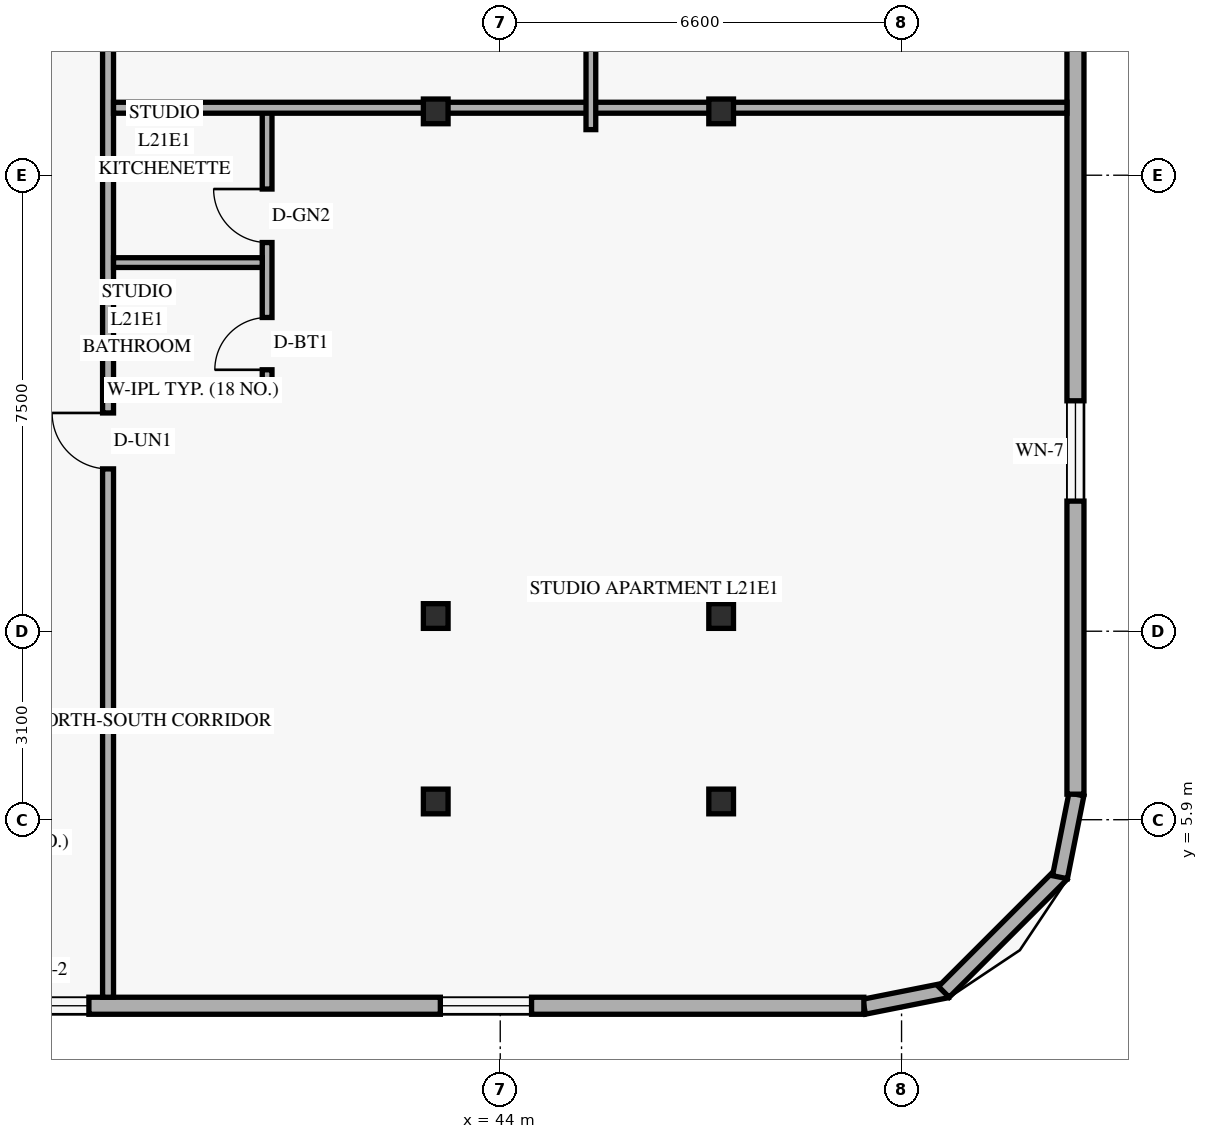
"""IFC4 building model, lengths in metres.
Left out: names, types, materials, properties, quantities, classifications, styles, units other than length and angle.
Written with IfcOpenShell. Run it as: python <this file> out.ifc"""

import sys

from ifc_helpers import new_model, si_unit, direction, frame, frame_2d, origin, origin_2d, place, context, subcontext, project, spatial, rectangle, hollow_rectangle, extrude, element, fill, save


model = new_model("IFC4")
c1 = context("Model", 3, precision=1e-05, world=origin(), true_north=direction((0.0, 1.0)))
c2 = subcontext(c1, "Body", "Model", "MODEL_VIEW")
j1 = project(units=[si_unit("LENGTHUNIT", "METRE"), si_unit("PLANEANGLEUNIT", "RADIAN")], contexts=[c1])
p1 = place(None, origin())
s1 = spatial("IfcSite", under=j1, at=p1, CompositionType="ELEMENT")
p2 = place(p1, origin())
s2 = spatial("IfcBuilding", under=s1, at=p2, CompositionType="ELEMENT")
p3 = place(p2, frame((0.0, 0.0, 84.0)))
s3 = spatial("IfcBuildingStorey", under=s2, at=p3, CompositionType="ELEMENT", Elevation=84.0)
for number, where, z_axis, x_axis in (
    (1, (42.876, 6.2, 0.0), (0.035, 0.0, 0.999), (0.0, 1.0, 0.0)),
    (2, (42.876, 9.25, 0.0), (0.035, 0.0, 0.999), (0.0, 1.0, 0.0)),
    (3, (42.876, 17.55, 0.0), (0.035, 0.0, 0.999), (0.0, 1.0, 0.0)),
):
    element("IfcColumn", number, at=place(p3, frame(where, z_axis=z_axis, x_axis=x_axis)), inside=s3, PredefinedType="COLUMN", context=c2, shape_type="SweptSolid", body=[
        extrude(hollow_rectangle(XDim=0.406, YDim=0.406, WallThickness=0.016, at=origin_2d()), origin(), (0.0, 0.0, 1.0), 3.602),
    ])
for number, where, z_axis, x_axis in (
    (4, (47.529, 6.2, 0.0), (0.058, 0.0, 0.998), (0.0, 1.0, 0.0)),
    (5, (47.529, 9.25, 0.0), (0.058, 0.0, 0.998), (0.0, 1.0, 0.0)),
    (6, (47.529, 17.55, 0.0), (0.058, 0.0, 0.998), (0.0, 1.0, 0.0)),
):
    element("IfcColumn", number, at=place(p3, frame(where, z_axis=z_axis, x_axis=x_axis)), inside=s3, PredefinedType="COLUMN", context=c2, shape_type="SweptSolid", body=[
        extrude(hollow_rectangle(XDim=0.406, YDim=0.406, WallThickness=0.016, at=origin_2d()), origin(), (0.0, 0.0, 1.0), 3.606),
    ])
p4 = place(p3, frame((49.983, 2.824, 0.0), z_axis=(0.0, 0.0, 1.0), x_axis=(0.980809899341, 0.19496651342, 0.0)))
e7 = element("IfcWall", 7, at=p4, inside=s3, PredefinedType="SOLIDWALL", context=c2, shape_type="SweptSolid", body=[
    extrude(rectangle(XDim=1.389, YDim=0.25, at=frame_2d((0.694, 0.0))), origin(), (0.0, 0.0, 1.0), 3.36),
])
p5 = place(p3, frame((51.295, 3.068, 0.0), z_axis=(0.0, 0.0, 1.0), x_axis=(0.707151344399, 0.707062215165, 0.0)))
e8 = element("IfcWall", 8, at=p5, inside=s3, PredefinedType="SOLIDWALL", context=c2, shape_type="SweptSolid", body=[
    extrude(rectangle(XDim=2.739, YDim=0.25, at=frame_2d((1.37, 0.0))), origin(), (0.0, 0.0, 1.0), 3.36),
])
p6 = place(p3, frame((53.205, 4.955, 0.0), z_axis=(0.0, 0.0, 1.0), x_axis=(0.195000137217, 0.980803214965, 0.0)))
e9 = element("IfcWall", 9, at=p6, inside=s3, PredefinedType="SOLIDWALL", context=c2, shape_type="SweptSolid", body=[
    extrude(rectangle(XDim=1.388, YDim=0.25, at=frame_2d((0.694, 0.0))), origin(), (0.0, 0.0, 1.0), 3.36),
])
p7 = place(p3, frame((34.4, 2.84, 0.0), z_axis=(0.0, 0.0, 1.0), x_axis=(1.0, 0.0, 0.0)))
e10 = element("IfcWall", 10, at=p7, inside=s3, PredefinedType="SOLIDWALL", context=c2, shape_type="SweptSolid", body=[
    extrude(rectangle(XDim=15.58, YDim=0.28, at=frame_2d((7.79, 0.0))), origin(), (0.0, 0.0, 1.0), 3.36),
])
p8 = place(p7, frame((1.335, 0.0, 0.85)))
e11 = element("IfcOpeningElement", 11, at=p8, cuts=e10, PredefinedType="OPENING", context=c2, shape_type="SweptSolid", body=[
    extrude(rectangle(XDim=1.5, YDim=1.55, at=frame_2d((0.75, 0.775))), frame((0.0, 0.15, 0.0), z_axis=(0.0, -1.0, 0.0), x_axis=(1.0, 0.0, 0.0)), (0.0, 0.0, 1.0), 0.3),
])
p9 = place(p7, frame((8.615, 0.0, 0.85)))
e12 = element("IfcOpeningElement", 12, at=p9, cuts=e10, PredefinedType="OPENING", context=c2, shape_type="SweptSolid", body=[
    extrude(rectangle(XDim=1.5, YDim=1.55, at=frame_2d((0.75, 0.775))), frame((0.0, 0.15, 0.0), z_axis=(0.0, -1.0, 0.0), x_axis=(1.0, 0.0, 0.0)), (0.0, 0.0, 1.0), 0.3),
])
p10 = place(p3, frame((53.46, 6.32, 0.0), z_axis=(0.0, 0.0, 1.0), x_axis=(0.0, 1.0, 0.0)))
e13 = element("IfcWall", 13, at=p10, inside=s3, PredefinedType="SOLIDWALL", context=c2, shape_type="SweptSolid", body=[
    extrude(rectangle(XDim=35.36, YDim=0.28, at=frame_2d((17.68, 0.0))), origin(), (0.0, 0.0, 1.0), 3.36),
])
p11 = place(p10, frame((4.82, 0.0, 0.85)))
e14 = element("IfcOpeningElement", 14, at=p11, cuts=e13, PredefinedType="OPENING", context=c2, shape_type="SweptSolid", body=[
    extrude(rectangle(XDim=1.65, YDim=1.6, at=frame_2d((0.825, 0.8))), frame((0.0, 0.15, 0.0), z_axis=(0.0, -1.0, 0.0), x_axis=(1.0, 0.0, 0.0)), (0.0, 0.0, 1.0), 0.3),
])
p12 = place(p10, frame((15.675, 0.0, 0.85)))
e15 = element("IfcOpeningElement", 15, at=p12, cuts=e13, PredefinedType="OPENING", context=c2, shape_type="SweptSolid", body=[
    extrude(rectangle(XDim=1.65, YDim=1.6, at=frame_2d((0.825, 0.8))), frame((0.0, 0.15, 0.0), z_axis=(0.0, -1.0, 0.0), x_axis=(1.0, 0.0, 0.0)), (0.0, 0.0, 1.0), 0.3),
])
p13 = place(p10, frame((23.13, 0.0, 0.85)))
e16 = element("IfcOpeningElement", 16, at=p13, cuts=e13, PredefinedType="OPENING", context=c2, shape_type="SweptSolid", body=[
    extrude(rectangle(XDim=1.65, YDim=1.6, at=frame_2d((0.825, 0.8))), frame((0.0, 0.15, 0.0), z_axis=(0.0, -1.0, 0.0), x_axis=(1.0, 0.0, 0.0)), (0.0, 0.0, 1.0), 0.3),
])
p14 = place(p10, frame((29.695, 0.0, 0.85)))
e17 = element("IfcOpeningElement", 17, at=p14, cuts=e13, PredefinedType="OPENING", context=c2, shape_type="SweptSolid", body=[
    extrude(rectangle(XDim=1.65, YDim=1.6, at=frame_2d((0.825, 0.8))), frame((0.0, 0.15, 0.0), z_axis=(0.0, -1.0, 0.0), x_axis=(1.0, 0.0, 0.0)), (0.0, 0.0, 1.0), 0.3),
])
p15 = place(p3, frame((37.55, 2.98, 0.0), z_axis=(0.0, 0.0, 1.0), x_axis=(0.0, 1.0, 0.0)))
e18 = element("IfcWall", 18, at=p15, inside=s3, PredefinedType="STANDARD", context=c2, shape_type="SweptSolid", body=[
    extrude(rectangle(XDim=42.04, YDim=0.18, at=frame_2d((21.02, 0.0))), origin(), (0.0, 0.0, 1.0), 2.731),
])
p16 = place(p15, frame((8.69, 0.0, 0.0)))
e19 = element("IfcOpeningElement", 19, at=p16, cuts=e18, PredefinedType="OPENING", context=c2, shape_type="SweptSolid", body=[
    extrude(rectangle(XDim=0.92, YDim=2.15, at=frame_2d((0.46, 1.075))), frame((0.0, 0.1, 0.0), z_axis=(0.0, -1.0, 0.0), x_axis=(1.0, 0.0, 0.0)), (0.0, 0.0, 1.0), 0.2),
])
p17 = place(p15, frame((19.043, 0.0, 0.0)))
e20 = element("IfcOpeningElement", 20, at=p17, cuts=e18, PredefinedType="OPENING", context=c2, shape_type="SweptSolid", body=[
    extrude(rectangle(XDim=0.92, YDim=2.15, at=frame_2d((0.46, 1.075))), frame((0.0, 0.1, 0.0), z_axis=(0.0, -1.0, 0.0), x_axis=(1.0, 0.0, 0.0)), (0.0, 0.0, 1.0), 0.2),
])
p18 = place(p15, frame((32.145, 0.0, 0.0)))
e21 = element("IfcOpeningElement", 21, at=p18, cuts=e18, PredefinedType="OPENING", context=c2, shape_type="SweptSolid", body=[
    extrude(rectangle(XDim=0.92, YDim=2.15, at=frame_2d((0.46, 1.075))), frame((0.0, 0.1, 0.0), z_axis=(0.0, -1.0, 0.0), x_axis=(1.0, 0.0, 0.0)), (0.0, 0.0, 1.0), 0.2),
])
p19 = place(p3, frame((37.64, 12.97, 0.0), z_axis=(0.0, 0.0, 1.0), x_axis=(1.0, 0.0, 0.0)))
e22 = element("IfcWall", 22, at=p19, inside=s3, PredefinedType="PLUMBINGWALL", context=c2, shape_type="SweptSolid", body=[
    extrude(rectangle(XDim=2.606, YDim=0.16, at=frame_2d((1.303, 0.0))), origin(), (0.0, 0.0, 1.0), 3.36),
])
p20 = place(p3, frame((40.166, 12.88, 0.0), z_axis=(0.0, 0.0, 1.0), x_axis=(0.0, 1.0, 0.0)))
e23 = element("IfcWall", 23, at=p20, inside=s3, PredefinedType="PLUMBINGWALL", context=c2, shape_type="SweptSolid", body=[
    extrude(rectangle(XDim=4.73, YDim=0.16, at=frame_2d((2.365, 0.0))), origin(), (0.0, 0.0, 1.0), 2.731),
])
p21 = place(p20, frame((0.42, 0.0, 0.0)))
e24 = element("IfcOpeningElement", 24, at=p21, cuts=e23, PredefinedType="OPENING", context=c2, shape_type="SweptSolid", body=[
    extrude(rectangle(XDim=0.86, YDim=2.12, at=frame_2d((0.43, 1.06))), frame((0.0, 0.09, 0.0), z_axis=(0.0, -1.0, 0.0), x_axis=(1.0, 0.0, 0.0)), (0.0, 0.0, 1.0), 0.18),
])
p22 = place(p20, frame((2.513, 0.0, 0.0)))
e25 = element("IfcOpeningElement", 25, at=p22, cuts=e23, PredefinedType="OPENING", context=c2, shape_type="SweptSolid", body=[
    extrude(rectangle(XDim=0.88, YDim=2.12, at=frame_2d((0.44, 1.06))), frame((0.0, 0.09, 0.0), z_axis=(0.0, -1.0, 0.0), x_axis=(1.0, 0.0, 0.0)), (0.0, 0.0, 1.0), 0.18),
])
p23 = place(p3, frame((37.64, 15.063, 0.0), z_axis=(0.0, 0.0, 1.0), x_axis=(1.0, 0.0, 0.0)))
e26 = element("IfcWall", 26, at=p23, inside=s3, PredefinedType="PLUMBINGWALL", context=c2, shape_type="SweptSolid", body=[
    extrude(rectangle(XDim=2.446, YDim=0.16, at=frame_2d((1.223, 0.0))), origin(), (0.0, 0.0, 1.0), 3.36),
])
p24 = place(p3, frame((37.64, 17.61, 0.0), z_axis=(0.0, 0.0, 1.0), x_axis=(1.0, 0.0, 0.0)))
e27 = element("IfcWall", 27, at=p24, inside=s3, PredefinedType="PARTITIONING", context=c2, shape_type="SweptSolid", body=[
    extrude(rectangle(XDim=15.68, YDim=0.18, at=frame_2d((7.84, 0.0))), origin(), (0.0, 0.0, 1.0), 2.731),
])
p25 = place(p3, frame((45.49, 17.25, 0.0), z_axis=(0.0, 0.0, 1.0), x_axis=(0.0, 1.0, 0.0)))
e28 = element("IfcWall", 28, at=p25, inside=s3, PredefinedType="PARTITIONING", context=c2, shape_type="SweptSolid", body=[
    extrude(rectangle(XDim=10.86, YDim=0.16, at=frame_2d((5.43, 0.0))), origin(), (0.0, 0.0, 1.0), 2.731),
])
p26 = place(p25, frame((4.67, 0.0, 0.0)))
e29 = element("IfcOpeningElement", 29, at=p26, cuts=e28, PredefinedType="OPENING", context=c2, shape_type="SweptSolid", body=[
    extrude(rectangle(XDim=0.95, YDim=2.15, at=frame_2d((0.475, 1.075))), frame((0.0, 0.09, 0.0), z_axis=(0.0, -1.0, 0.0), x_axis=(1.0, 0.0, 0.0)), (0.0, 0.0, 1.0), 0.18),
])
p27 = place(p8, origin())
e30 = element("IfcWindow", 30, at=p27, inside=s3, PartitioningType="SINGLE_PANEL", PredefinedType="WINDOW", context=c2, shape_type="SweptSolid", body=[
    extrude(rectangle(XDim=1.5, YDim=1.55, at=frame_2d((0.75, 0.775))), frame((0.0, 0.03, 0.0), z_axis=(0.0, -1.0, 0.0), x_axis=(1.0, 0.0, 0.0)), (0.0, 0.0, 1.0), 0.06),
])
fill(e11, e30)
p28 = place(p9, origin())
e31 = element("IfcWindow", 31, at=p28, inside=s3, PartitioningType="SINGLE_PANEL", PredefinedType="WINDOW", context=c2, shape_type="SweptSolid", body=[
    extrude(rectangle(XDim=1.5, YDim=1.55, at=frame_2d((0.75, 0.775))), frame((0.0, 0.03, 0.0), z_axis=(0.0, -1.0, 0.0), x_axis=(1.0, 0.0, 0.0)), (0.0, 0.0, 1.0), 0.06),
])
fill(e12, e31)
p29 = place(p11, origin())
e32 = element("IfcWindow", 32, at=p29, inside=s3, PartitioningType="SINGLE_PANEL", PredefinedType="WINDOW", context=c2, shape_type="SweptSolid", body=[
    extrude(rectangle(XDim=1.65, YDim=1.6, at=frame_2d((0.825, 0.8))), frame((0.0, 0.03, 0.0), z_axis=(0.0, -1.0, 0.0), x_axis=(1.0, 0.0, 0.0)), (0.0, 0.0, 1.0), 0.06),
])
fill(e14, e32)
p30 = place(p16, origin())
e33 = element("IfcDoor", 33, at=p30, inside=s3, OperationType="SINGLE_SWING_RIGHT", PredefinedType="DOOR", context=c2, shape_type="SweptSolid", body=[
    extrude(rectangle(XDim=0.92, YDim=2.15, at=frame_2d((0.46, 1.075))), frame((0.0, 0.025, 0.0), z_axis=(0.0, -1.0, 0.0), x_axis=(1.0, 0.0, 0.0)), (0.0, 0.0, 1.0), 0.05),
])
fill(e19, e33)
p31 = place(p21, origin())
e34 = element("IfcDoor", 34, at=p31, inside=s3, OperationType="SINGLE_SWING_LEFT", PredefinedType="DOOR", context=c2, shape_type="SweptSolid", body=[
    extrude(rectangle(XDim=0.86, YDim=2.12, at=frame_2d((0.43, 1.06))), frame((0.0, 0.025, 0.0), z_axis=(0.0, -1.0, 0.0), x_axis=(1.0, 0.0, 0.0)), (0.0, 0.0, 1.0), 0.05),
])
fill(e24, e34)
p32 = place(p22, origin())
e35 = element("IfcDoor", 35, at=p32, inside=s3, OperationType="SINGLE_SWING_RIGHT", PredefinedType="DOOR", context=c2, shape_type="SweptSolid", body=[
    extrude(rectangle(XDim=0.88, YDim=2.12, at=frame_2d((0.44, 1.06))), frame((0.0, 0.025, 0.0), z_axis=(0.0, -1.0, 0.0), x_axis=(1.0, 0.0, 0.0)), (0.0, 0.0, 1.0), 0.05),
])
fill(e25, e35)
save(model, sys.argv[1])
